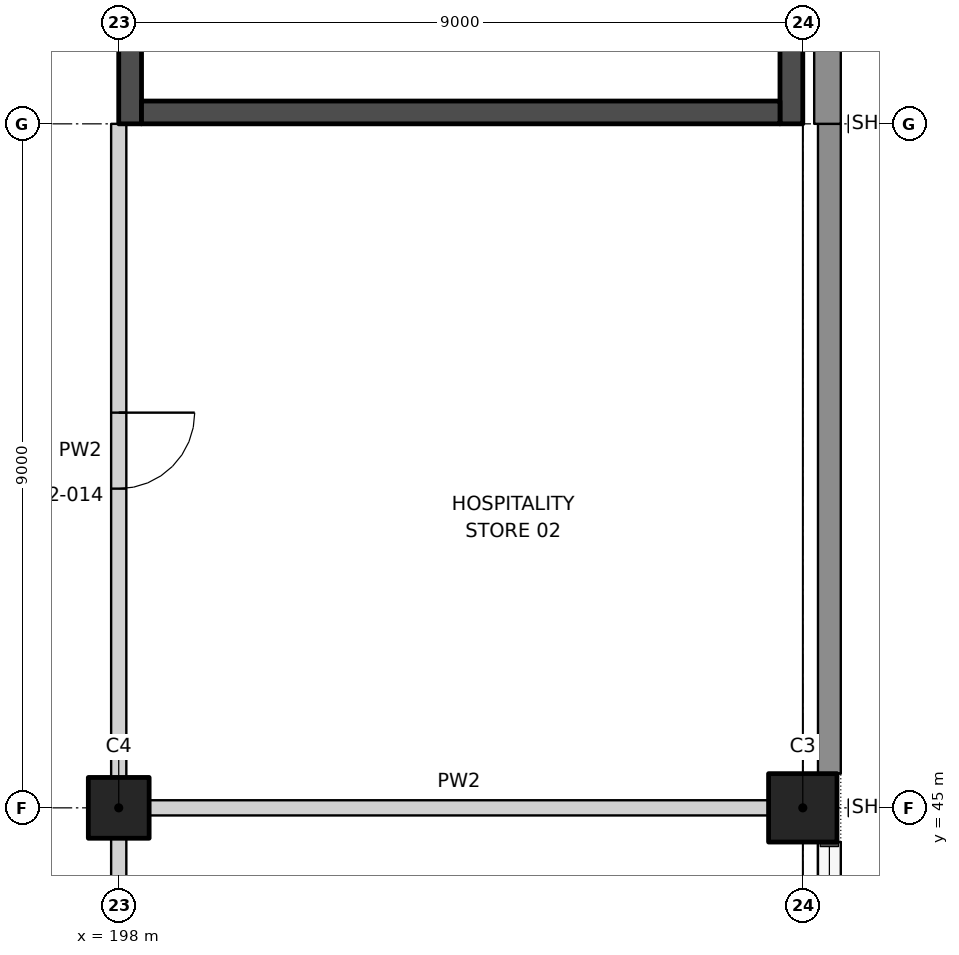
"""IFC4 building model, lengths in metres.
Left out: names, types, materials, properties, quantities, classifications, styles, units other than length and angle.
Written with IfcOpenShell. Run it as: python <this file> out.ifc"""

import sys

from ifc_helpers import new_model, si_unit, direction, frame, frame_2d, origin, origin_2d, place, context, subcontext, project, spatial, rectangle, extrude, element, fill, save


model = new_model("IFC4")
c1 = context("Model", 3, precision=1e-05, world=origin(), true_north=direction((0.0, 1.0)))
c2 = subcontext(c1, "Body", "Model", "MODEL_VIEW")
j1 = project(units=[si_unit("LENGTHUNIT", "METRE"), si_unit("PLANEANGLEUNIT", "RADIAN")], contexts=[c1])
p1 = place(None, origin())
s1 = spatial("IfcSite", under=j1, at=p1, CompositionType="ELEMENT")
p2 = place(p1, origin())
s2 = spatial("IfcBuilding", under=s1, at=p2, CompositionType="ELEMENT")
p3 = place(p2, frame((0.0, 0.0, 11.5)))
s3 = spatial("IfcBuildingStorey", under=s2, at=p3, CompositionType="ELEMENT", Elevation=11.5)
p4 = place(p3, frame((207.0, 45.0, 0.0), z_axis=(0.0, 0.0, 1.0), x_axis=(1.0, 0.0, 0.0)))
e1 = element("IfcColumn", 1, at=p4, inside=s3, PredefinedType="COLUMN", context=c2, shape_type="SweptSolid", body=[
    extrude(rectangle(XDim=0.9, YDim=0.9, at=origin_2d()), origin(), (0.0, 0.0, 1.0), 10.5),
])
p5 = place(p3, frame((198.0, 45.0, 0.0), z_axis=(0.0, 0.0, 1.0), x_axis=(1.0, 0.0, 0.0)))
e2 = element("IfcColumn", 2, at=p5, inside=s3, PredefinedType="COLUMN", context=c2, shape_type="SweptSolid", body=[
    extrude(rectangle(XDim=0.8, YDim=0.8, at=origin_2d()), origin(), (0.0, 0.0, 1.0), 10.5),
])
p6 = place(p3, frame((198.4, 45.0, 0.0), z_axis=(0.0, 0.0, 1.0), x_axis=(1.0, 0.0, 0.0)))
e3 = element("IfcWall", 3, at=p6, inside=s3, PredefinedType="PARTITIONING", context=c2, shape_type="SweptSolid", body=[
    extrude(rectangle(XDim=8.15, YDim=0.2, at=frame_2d((4.075, 0.0))), origin(), (0.0, 0.0, 1.0), 9.25),
])
p7 = place(p3, frame((198.0, 36.4, 0.0), z_axis=(0.0, 0.0, 1.0), x_axis=(0.0, 1.0, 0.0)))
e4 = element("IfcWall", 4, at=p7, inside=s3, PredefinedType="PARTITIONING", context=c2, shape_type="SweptSolid", body=[
    extrude(rectangle(XDim=8.2, YDim=0.2, at=frame_2d((4.1, 0.0))), origin(), (0.0, 0.0, 1.0), 9.25),
])
p8 = place(p7, frame((3.2, 0.0, 0.0)))
e5 = element("IfcOpeningElement", 5, at=p8, cuts=e4, PredefinedType="OPENING", context=c2, shape_type="SweptSolid", body=[
    extrude(rectangle(XDim=1.8, YDim=2.1, at=frame_2d((0.9, 1.05))), frame((0.0, 0.11, 0.0), z_axis=(0.0, -1.0, 0.0), x_axis=(1.0, 0.0, 0.0)), (0.0, 0.0, 1.0), 0.22),
])
p9 = place(p3, frame((198.0, 45.4, 0.0), z_axis=(0.0, 0.0, 1.0), x_axis=(0.0, 1.0, 0.0)))
e6 = element("IfcWall", 6, at=p9, inside=s3, PredefinedType="PARTITIONING", context=c2, shape_type="SweptSolid", body=[
    extrude(rectangle(XDim=8.6, YDim=0.2, at=frame_2d((4.3, 0.0))), origin(), (0.0, 0.0, 1.0), 9.15),
])
p10 = place(p9, frame((3.8, 0.0, 0.0)))
e7 = element("IfcOpeningElement", 7, at=p10, cuts=e6, PredefinedType="OPENING", context=c2, shape_type="SweptSolid", body=[
    extrude(rectangle(XDim=1.0, YDim=2.1, at=frame_2d((0.5, 1.05))), frame((0.0, 0.11, 0.0), z_axis=(0.0, -1.0, 0.0), x_axis=(1.0, 0.0, 0.0)), (0.0, 0.0, 1.0), 0.22),
])
p11 = place(p3, frame((207.35, 36.45, 0.0), z_axis=(0.0, 0.0, 1.0), x_axis=(0.0, 1.0, 0.0)))
e8 = element("IfcWall", 8, at=p11, inside=s3, PredefinedType="SOLIDWALL", context=c2, shape_type="SweptSolid", body=[
    extrude(rectangle(XDim=8.1, YDim=0.3, at=frame_2d((4.05, 0.0))), origin(), (0.0, 0.0, 1.0), 1.0),
])
p12 = place(p3, frame((207.35, 45.45, 0.0), z_axis=(0.0, 0.0, 1.0), x_axis=(0.0, 1.0, 0.0)))
e9 = element("IfcWall", 9, at=p12, inside=s3, PredefinedType="SOLIDWALL", context=c2, shape_type="SweptSolid", body=[
    extrude(rectangle(XDim=8.55, YDim=0.3, at=frame_2d((4.275, 0.0))), origin(), (0.0, 0.0, 1.0), 10.5),
])
p13 = place(p3, frame((207.325, 54.0, 0.0), z_axis=(0.0, 0.0, 1.0), x_axis=(0.0, 1.0, 0.0)))
e10 = element("IfcWall", 10, at=p13, inside=s3, PredefinedType="SOLIDWALL", context=c2, shape_type="SweptSolid", body=[
    extrude(rectangle(XDim=9.0, YDim=0.35, at=frame_2d((4.5, 0.0))), origin(), (0.0, 0.0, 1.0), 10.5),
])
p14 = place(p3, frame((198.15, 54.0, 0.0), z_axis=(0.0, 0.0, 1.0), x_axis=(0.0, 1.0, 0.0)))
e11 = element("IfcWall", 11, at=p14, inside=s3, PredefinedType="SHEAR", context=c2, shape_type="SweptSolid", body=[
    extrude(rectangle(XDim=18.0, YDim=0.3, at=frame_2d((9.0, 0.0))), origin(), (0.0, 0.0, 1.0), 10.5),
])
p15 = place(p14, frame((1.5, 0.0, 0.0)))
e12 = element("IfcOpeningElement", 12, at=p15, cuts=e11, PredefinedType="OPENING", context=c2, shape_type="SweptSolid", body=[
    extrude(rectangle(XDim=1.2, YDim=2.1, at=frame_2d((0.6, 1.05))), frame((0.0, 0.16, 0.0), z_axis=(0.0, -1.0, 0.0), x_axis=(1.0, 0.0, 0.0)), (0.0, 0.0, 1.0), 0.32),
])
p16 = place(p3, frame((206.85, 54.0, 0.0), z_axis=(0.0, 0.0, 1.0), x_axis=(0.0, 1.0, 0.0)))
e13 = element("IfcWall", 13, at=p16, inside=s3, PredefinedType="SHEAR", context=c2, shape_type="SweptSolid", body=[
    extrude(rectangle(XDim=18.0, YDim=0.3, at=frame_2d((9.0, 0.0))), origin(), (0.0, 0.0, 1.0), 10.5),
])
p17 = place(p3, frame((198.3, 54.15, 0.0), z_axis=(0.0, 0.0, 1.0), x_axis=(1.0, 0.0, 0.0)))
e14 = element("IfcWall", 14, at=p17, inside=s3, PredefinedType="SHEAR", context=c2, shape_type="SweptSolid", body=[
    extrude(rectangle(XDim=8.4, YDim=0.3, at=frame_2d((4.2, 0.0))), origin(), (0.0, 0.0, 1.0), 10.5),
])
p18 = place(p10, frame((1.0, 0.0, 0.0), z_axis=(0.0, 0.0, 1.0), x_axis=(-1.0, 0.0, 0.0)))
e15 = element("IfcDoor", 15, at=p18, inside=s3, OperationType="SINGLE_SWING_LEFT", PredefinedType="DOOR", context=c2, shape_type="SweptSolid", body=[
    extrude(rectangle(XDim=1.0, YDim=2.1, at=frame_2d((0.5, 1.05))), frame((0.0, 0.025, 0.0), z_axis=(0.0, -1.0, 0.0), x_axis=(1.0, 0.0, 0.0)), (0.0, 0.0, 1.0), 0.05),
])
fill(e7, e15)
save(model, sys.argv[1])
